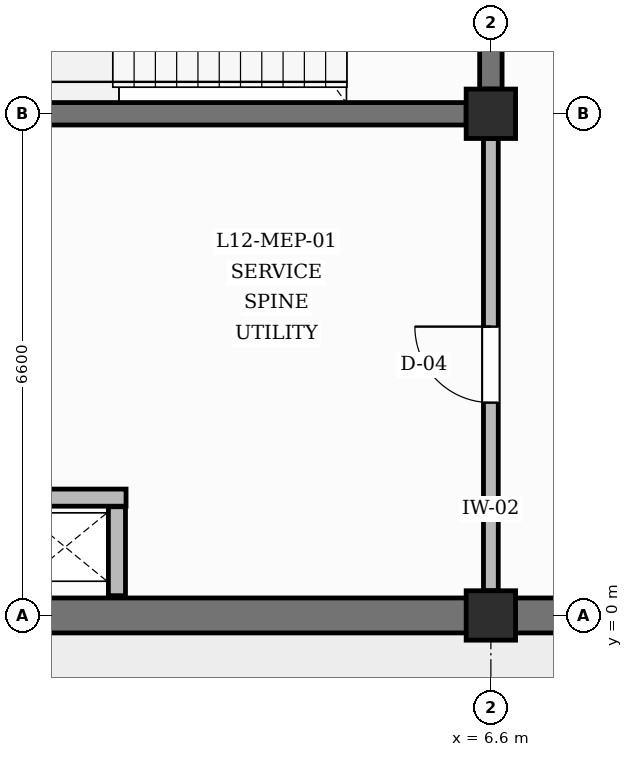
"""IFC4 building model, lengths in metres.
Left out: names, types, materials, properties, quantities, classifications, styles, units other than length and angle.
Written with IfcOpenShell. Run it as: python <this file> out.ifc"""

import sys

from ifc_helpers import new_model, si_unit, direction, frame, frame_2d, origin, origin_2d, place, context, subcontext, project, spatial, rectangle, extrude, element, fill, save


model = new_model("IFC4")
c1 = context("Model", 3, precision=1e-05, world=origin(), true_north=direction((0.0, 1.0)))
c2 = subcontext(c1, "Body", "Model", "MODEL_VIEW")
j1 = project(units=[si_unit("LENGTHUNIT", "METRE"), si_unit("PLANEANGLEUNIT", "RADIAN")], contexts=[c1])
p1 = place(None, origin())
s1 = spatial("IfcSite", under=j1, at=p1, CompositionType="ELEMENT")
p2 = place(p1, origin())
s2 = spatial("IfcBuilding", under=s1, at=p2, CompositionType="ELEMENT")
p3 = place(p2, frame((0.0, 0.0, 52.2)))
s3 = spatial("IfcBuildingStorey", under=s2, at=p3, CompositionType="ELEMENT", Elevation=52.2)
for number, where, z_axis, x_axis in (
    (1, (6.6, 0.0, 0.0), (0.0, 0.0, 1.0), (1.0, 0.0, 0.0)),
    (2, (6.6, 6.6, 0.0), (0.0, 0.0, 1.0), (1.0, 0.0, 0.0)),
):
    element("IfcColumn", number, at=place(p3, frame(where, z_axis=z_axis, x_axis=x_axis)), inside=s3, PredefinedType="COLUMN", context=c2, shape_type="SweptSolid", body=[
        extrude(rectangle(XDim=0.65, YDim=0.65, at=origin_2d()), origin(), (0.0, 0.0, 1.0), 4.2),
    ])
for number, where, z_axis, x_axis in (
    (3, (0.325, 0.0, 0.0), (0.0, 0.0, 1.0), (1.0, 0.0, 0.0)),
    (4, (6.925, 0.0, 0.0), (0.0, 0.0, 1.0), (1.0, 0.0, 0.0)),
):
    element("IfcWall", number, at=place(p3, frame(where, z_axis=z_axis, x_axis=x_axis)), inside=s3, PredefinedType="SOLIDWALL", context=c2, shape_type="SweptSolid", body=[
        extrude(rectangle(XDim=5.95, YDim=0.46, at=frame_2d((2.975, 0.0))), origin(), (0.0, 0.0, 1.0), 3.3),
    ])
p4 = place(p3, frame((0.325, 6.6, 0.0), z_axis=(0.0, 0.0, 1.0), x_axis=(1.0, 0.0, 0.0)))
e5 = element("IfcWall", 5, at=p4, inside=s3, PredefinedType="SHEAR", context=c2, shape_type="SweptSolid", body=[
    extrude(rectangle(XDim=5.95, YDim=0.295, at=frame_2d((2.975, 0.0))), origin(), (0.0, 0.0, 1.0), 3.3),
])
p5 = place(p3, frame((6.6, 6.925, 0.0), z_axis=(0.0, 0.0, 1.0), x_axis=(0.0, 1.0, 0.0)))
e6 = element("IfcWall", 6, at=p5, inside=s3, PredefinedType="SHEAR", context=c2, shape_type="SweptSolid", body=[
    extrude(rectangle(XDim=5.95, YDim=0.295, at=frame_2d((2.975, 0.0))), origin(), (0.0, 0.0, 1.0), 3.3),
])
p6 = place(p5, frame((2.4, 0.0, 0.0)))
e7 = element("IfcOpeningElement", 7, at=p6, cuts=e6, PredefinedType="OPENING", context=c2, shape_type="SweptSolid", body=[
    extrude(rectangle(XDim=1.15, YDim=2.2, at=frame_2d((0.575, 1.1))), frame((0.0, 0.157, 0.0), z_axis=(0.0, -1.0, 0.0), x_axis=(1.0, 0.0, 0.0)), (0.0, 0.0, 1.0), 0.315),
])
p7 = place(p3, frame((1.68, 0.26, 0.0), z_axis=(0.0, 0.0, 1.0), x_axis=(0.0, 1.0, 0.0)))
e8 = element("IfcWall", 8, at=p7, inside=s3, PredefinedType="PARTITIONING", context=c2, shape_type="SweptSolid", body=[
    extrude(rectangle(XDim=1.17, YDim=0.225, at=frame_2d((0.585, 0.0))), origin(), (0.0, 0.0, 1.0), 3.9),
])
p8 = place(p3, frame((0.26, 1.55, 0.0), z_axis=(0.0, 0.0, 1.0), x_axis=(1.0, 0.0, 0.0)))
e9 = element("IfcWall", 9, at=p8, inside=s3, PredefinedType="PARTITIONING", context=c2, shape_type="SweptSolid", body=[
    extrude(rectangle(XDim=1.54, YDim=0.225, at=frame_2d((0.77, 0.0))), origin(), (0.0, 0.0, 1.0), 3.9),
])
p9 = place(p3, frame((6.6, 0.325, 0.0), z_axis=(0.0, 0.0, 1.0), x_axis=(0.0, 1.0, 0.0)))
e10 = element("IfcWall", 10, at=p9, inside=s3, PredefinedType="PARTITIONING", context=c2, shape_type="SweptSolid", body=[
    extrude(rectangle(XDim=5.95, YDim=0.195, at=frame_2d((2.975, 0.0))), origin(), (0.0, 0.0, 1.0), 3.3),
])
p10 = place(p9, frame((2.475, 0.0, 0.0)))
e11 = element("IfcOpeningElement", 11, at=p10, cuts=e10, PredefinedType="OPENING", context=c2, shape_type="SweptSolid", body=[
    extrude(rectangle(XDim=1.0, YDim=2.1, at=frame_2d((0.5, 1.05))), frame((0.0, 0.107, 0.0), z_axis=(0.0, -1.0, 0.0), x_axis=(1.0, 0.0, 0.0)), (0.0, 0.0, 1.0), 0.215),
])
p11 = place(p10, origin())
e12 = element("IfcDoor", 12, at=p11, inside=s3, OperationType="SINGLE_SWING_RIGHT", PredefinedType="DOOR", context=c2, shape_type="SweptSolid", body=[
    extrude(rectangle(XDim=1.0, YDim=2.1, at=frame_2d((0.5, 1.05))), frame((0.0, 0.025, 0.0), z_axis=(0.0, -1.0, 0.0), x_axis=(1.0, 0.0, 0.0)), (0.0, 0.0, 1.0), 0.05),
])
fill(e11, e12)
save(model, sys.argv[1])
